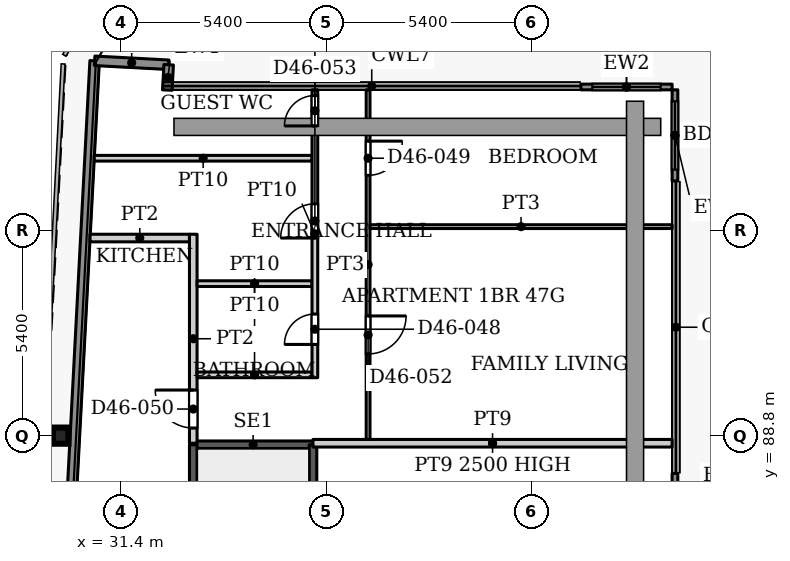
"""IFC4 building model, lengths in metres.
Left out: names, types, materials, properties, quantities, classifications, styles, units other than length and angle.
Written with IfcOpenShell. Run it as: python <this file> out.ifc"""

import sys

from ifc_helpers import new_model, si_unit, direction, frame, frame_2d, origin, origin_2d, place, context, subcontext, project, spatial, rectangle, i_section, extrude, source, transform, mapped, element, fill, save


model = new_model("IFC4")
c1 = context("Model", 3, precision=1e-05, world=origin(), true_north=direction((0.0, 1.0)))
c2 = subcontext(c1, "Body", "Model", "MODEL_VIEW")
j1 = project(units=[si_unit("LENGTHUNIT", "METRE"), si_unit("PLANEANGLEUNIT", "RADIAN")], contexts=[c1])
p1 = place(None, origin())
s1 = spatial("IfcSite", under=j1, at=p1, CompositionType="ELEMENT")
p2 = place(p1, origin())
s2 = spatial("IfcBuilding", under=s1, at=p2, CompositionType="ELEMENT")
p3 = place(p2, frame((0.0, 0.0, 199.4)))
s3 = spatial("IfcBuildingStorey", under=s2, at=p3, CompositionType="ELEMENT", Elevation=199.4)
p4 = place(p3, frame((29.811, 88.8, 0.0), z_axis=(0.0, 0.0, 1.0), x_axis=(1.0, 0.0, 0.0)))
e1 = element("IfcColumn", 1, at=p4, inside=s3, PredefinedType="COLUMN", context=c2, shape_type="SweptSolid", body=[
    extrude(i_section(OverallWidth=0.409, OverallDepth=0.425, WebThickness=0.033, FlangeThickness=0.052, FilletRadius=0.013, at=origin_2d()), origin(), (0.0, 0.0, 1.0), 3.9),
])
p5 = place(p3, frame((27.195, 31.969, 0.0), z_axis=(0.0, 0.0, 1.0), x_axis=(0.052554995867, 0.998618031286, 0.0)))
e2 = element("IfcWall", 2, at=p5, inside=s3, PredefinedType="SOLIDWALL", context=c2, shape_type="SweptSolid", body=[
    extrude(rectangle(XDim=66.787, YDim=0.25, at=frame_2d((33.394, 0.0))), origin(), (0.0, 0.0, 1.0), 3.75),
])
p6 = place(p3, frame((30.705, 98.664, 0.0), z_axis=(0.0, 0.0, 1.0), x_axis=(0.998577785791, -0.053314216913, 0.0)))
e3 = element("IfcWall", 3, at=p6, inside=s3, PredefinedType="SOLIDWALL", context=c2, shape_type="SweptSolid", body=[
    extrude(rectangle(XDim=1.951, YDim=0.25, at=frame_2d((0.975, 0.0))), origin(), (0.0, 0.0, 1.0), 3.75),
])
p7 = place(p3, frame((32.653, 98.56, 0.0), z_axis=(0.0, 0.0, 1.0), x_axis=(-0.054093451632, -0.998535877418, 0.0)))
e4 = element("IfcWall", 4, at=p7, inside=s3, PredefinedType="SOLIDWALL", context=c2, shape_type="SweptSolid", body=[
    extrude(rectangle(XDim=0.668, YDim=0.25, at=frame_2d((0.334, 0.0))), origin(), (0.0, 0.0, 1.0), 3.75),
])
p8 = place(p3, frame((43.5, 97.975, 0.0), z_axis=(0.0, 0.0, 1.0), x_axis=(1.0, 0.0, 0.0)))
e5 = element("IfcWall", 5, at=p8, inside=s3, PredefinedType="SOLIDWALL", context=c2, shape_type="SweptSolid", body=[
    extrude(rectangle(XDim=2.4, YDim=0.15, at=frame_2d((1.2, 0.0))), origin(), (0.0, 0.0, 1.0), 3.75),
])
p9 = place(p8, frame((0.3, 0.0, 0.0)))
e6 = element("IfcOpeningElement", 6, at=p9, cuts=e5, PredefinedType="OPENING", context=c2, shape_type="SweptSolid", body=[
    extrude(rectangle(XDim=1.8, YDim=2.4, at=frame_2d((0.9, 1.2))), frame((0.0, 0.085, 0.0), z_axis=(0.0, -1.0, 0.0), x_axis=(1.0, 0.0, 0.0)), (0.0, 0.0, 1.0), 0.17),
])
p10 = place(p3, frame((45.975, 97.9, 0.0), z_axis=(0.0, 0.0, 1.0), x_axis=(0.0, -1.0, 0.0)))
e7 = element("IfcWall", 7, at=p10, inside=s3, PredefinedType="SOLIDWALL", context=c2, shape_type="SweptSolid", body=[
    extrude(rectangle(XDim=2.4, YDim=0.15, at=frame_2d((1.2, 0.0))), origin(), (0.0, 0.0, 1.0), 3.75),
])
p11 = place(p10, frame((0.3, 0.0, 0.0)))
e8 = element("IfcOpeningElement", 8, at=p11, cuts=e7, PredefinedType="OPENING", context=c2, shape_type="SweptSolid", body=[
    extrude(rectangle(XDim=1.8, YDim=2.4, at=frame_2d((0.9, 1.2))), frame((0.0, 0.085, 0.0), z_axis=(0.0, -1.0, 0.0), x_axis=(1.0, 0.0, 0.0)), (0.0, 0.0, 1.0), 0.17),
])
p12 = place(p3, frame((45.975, 87.806, 0.0), z_axis=(0.0, 0.0, 1.0), x_axis=(0.0, -1.0, 0.0)))
e9 = element("IfcWall", 9, at=p12, inside=s3, PredefinedType="SOLIDWALL", context=c2, shape_type="SweptSolid", body=[
    extrude(rectangle(XDim=2.4, YDim=0.15, at=frame_2d((1.2, 0.0))), origin(), (0.0, 0.0, 1.0), 3.75),
])
p13 = place(p12, frame((0.3, 0.0, 0.0)))
e10 = element("IfcOpeningElement", 10, at=p13, cuts=e9, PredefinedType="OPENING", context=c2, shape_type="SweptSolid", body=[
    extrude(rectangle(XDim=1.8, YDim=2.4, at=frame_2d((0.9, 1.2))), frame((0.0, 0.085, 0.0), z_axis=(0.0, -1.0, 0.0), x_axis=(1.0, 0.0, 0.0)), (0.0, 0.0, 1.0), 0.17),
])
p14 = place(p3, frame((33.3, 88.56, 0.0), z_axis=(0.0, 0.0, 1.0), x_axis=(1.0, 0.0, 0.0)))
e11 = element("IfcWall", 11, at=p14, inside=s3, PredefinedType="SHEAR", context=c2, shape_type="SweptSolid", body=[
    extrude(rectangle(XDim=3.15, YDim=0.2, at=frame_2d((1.575, 0.0))), origin(), (0.0, 0.0, 1.0), 3.9),
])
p15 = place(p3, frame((33.3, 79.4, 0.0), z_axis=(0.0, 0.0, 1.0), x_axis=(0.0, 1.0, 0.0)))
e12 = element("IfcWall", 12, at=p15, inside=s3, PredefinedType="SHEAR", context=c2, shape_type="SweptSolid", body=[
    extrude(rectangle(XDim=9.16, YDim=0.2, at=frame_2d((4.58, 0.0))), origin(), (0.0, 0.0, 1.0), 3.9),
])
p16 = place(p15, frame((0.35, 0.0, 0.0)))
e13 = element("IfcOpeningElement", 13, at=p16, cuts=e12, PredefinedType="OPENING", context=c2, shape_type="SweptSolid", body=[
    extrude(rectangle(XDim=1.1, YDim=2.2, at=frame_2d((0.55, 1.1))), frame((0.0, 0.11, 0.0), z_axis=(0.0, -1.0, 0.0), x_axis=(1.0, 0.0, 0.0)), (0.0, 0.0, 1.0), 0.22),
])
p17 = place(p3, frame((36.45, 79.4, 0.0), z_axis=(0.0, 0.0, 1.0), x_axis=(0.0, 1.0, 0.0)))
e14 = element("IfcWall", 14, at=p17, inside=s3, PredefinedType="SHEAR", context=c2, shape_type="SweptSolid", body=[
    extrude(rectangle(XDim=9.16, YDim=0.2, at=frame_2d((4.58, 0.0))), origin(), (0.0, 0.0, 1.0), 3.9),
])
p18 = place(p3, frame((30.695, 96.1, 0.0), z_axis=(0.0, 0.0, 1.0), x_axis=(1.0, 0.0, 0.0)))
e15 = element("IfcWall", 15, at=p18, inside=s3, PredefinedType="PARTITIONING", context=c2, shape_type="SweptSolid", body=[
    extrude(rectangle(XDim=5.73, YDim=0.15, at=frame_2d((2.865, 0.0))), origin(), (0.0, 0.0, 1.0), 3.6),
])
p19 = place(p3, frame((30.585, 94.0, 0.0), z_axis=(0.0, 0.0, 1.0), x_axis=(1.0, 0.0, 0.0)))
e16 = element("IfcWall", 16, at=p19, inside=s3, PredefinedType="PARTITIONING", context=c2, shape_type="SweptSolid", body=[
    extrude(rectangle(XDim=2.615, YDim=0.2, at=frame_2d((1.308, 0.0))), origin(), (0.0, 0.0, 1.0), 3.6),
])
p20 = place(p3, frame((33.3, 88.6, 0.0), z_axis=(0.0, 0.0, 1.0), x_axis=(0.0, 1.0, 0.0)))
e17 = element("IfcWall", 17, at=p20, inside=s3, PredefinedType="PARTITIONING", context=c2, shape_type="SweptSolid", body=[
    extrude(rectangle(XDim=5.5, YDim=0.2, at=frame_2d((2.75, 0.0))), origin(), (0.0, 0.0, 1.0), 3.6),
])
p21 = place(p20, frame((0.4, 0.0, 0.0)))
e18 = element("IfcOpeningElement", 18, at=p21, cuts=e17, PredefinedType="OPENING", context=c2, shape_type="SweptSolid", body=[
    extrude(rectangle(XDim=1.0, YDim=2.1, at=frame_2d((0.5, 1.05))), frame((0.0, 0.11, 0.0), z_axis=(0.0, -1.0, 0.0), x_axis=(1.0, 0.0, 0.0)), (0.0, 0.0, 1.0), 0.22),
])
for number, where, z_axis, x_axis in (
    (19, (33.4, 90.4, 0.0), (0.0, 0.0, 1.0), (1.0, 0.0, 0.0)),
    (20, (33.4, 92.8, 0.0), (0.0, 0.0, 1.0), (1.0, 0.0, 0.0)),
):
    element("IfcWall", number, at=place(p3, frame(where, z_axis=z_axis, x_axis=x_axis)), inside=s3, PredefinedType="PARTITIONING", context=c2, shape_type="SweptSolid", body=[
        extrude(rectangle(XDim=3.025, YDim=0.15, at=frame_2d((1.513, 0.0))), origin(), (0.0, 0.0, 1.0), 3.6),
    ])
p22 = place(p3, frame((36.45, 88.6, 0.0), z_axis=(0.0, 0.0, 1.0), x_axis=(1.0, 0.0, 0.0)))
e21 = element("IfcWall", 21, at=p22, inside=s3, PredefinedType="PARTITIONING", context=c2, shape_type="SweptSolid", body=[
    extrude(rectangle(XDim=9.45, YDim=0.2, at=frame_2d((4.725, 0.0))), origin(), (0.0, 0.0, 1.0), 2.5),
])
p23 = place(p3, frame((36.5, 90.325, 0.0), z_axis=(0.0, 0.0, 1.0), x_axis=(0.0, 1.0, 0.0)))
e22 = element("IfcWall", 22, at=p23, inside=s3, PredefinedType="PARTITIONING", context=c2, shape_type="SweptSolid", body=[
    extrude(rectangle(XDim=7.575, YDim=0.15, at=frame_2d((3.788, 0.0))), origin(), (0.0, 0.0, 1.0), 3.6),
])
p24 = place(p23, frame((0.875, 0.0, 0.0)))
e23 = element("IfcOpeningElement", 23, at=p24, cuts=e22, PredefinedType="OPENING", context=c2, shape_type="SweptSolid", body=[
    extrude(rectangle(XDim=0.8, YDim=2.1, at=frame_2d((0.4, 1.05))), frame((0.0, 0.085, 0.0), z_axis=(0.0, -1.0, 0.0), x_axis=(1.0, 0.0, 0.0)), (0.0, 0.0, 1.0), 0.17),
])
p25 = place(p23, frame((3.675, 0.0, 0.0)))
e24 = element("IfcOpeningElement", 24, at=p25, cuts=e22, PredefinedType="OPENING", context=c2, shape_type="SweptSolid", body=[
    extrude(rectangle(XDim=0.9, YDim=2.1, at=frame_2d((0.45, 1.05))), frame((0.0, 0.085, 0.0), z_axis=(0.0, -1.0, 0.0), x_axis=(1.0, 0.0, 0.0)), (0.0, 0.0, 1.0), 0.17),
])
p26 = place(p23, frame((6.625, 0.0, 0.0)))
e25 = element("IfcOpeningElement", 25, at=p26, cuts=e22, PredefinedType="OPENING", context=c2, shape_type="SweptSolid", body=[
    extrude(rectangle(XDim=0.8, YDim=2.1, at=frame_2d((0.4, 1.05))), frame((0.0, 0.085, 0.0), z_axis=(0.0, -1.0, 0.0), x_axis=(1.0, 0.0, 0.0)), (0.0, 0.0, 1.0), 0.17),
])
p27 = place(p3, frame((37.9, 88.7, 0.0), z_axis=(0.0, 0.0, 1.0), x_axis=(0.0, 1.0, 0.0)))
e26 = element("IfcWall", 26, at=p27, inside=s3, PredefinedType="PARTITIONING", context=c2, shape_type="SweptSolid", body=[
    extrude(rectangle(XDim=9.2, YDim=0.1, at=frame_2d((4.6, 0.0))), origin(), (0.0, 0.0, 1.0), 3.6),
])
p28 = place(p27, frame((6.95, 0.0, 0.0)))
e27 = element("IfcOpeningElement", 27, at=p28, cuts=e26, PredefinedType="OPENING", context=c2, shape_type="SweptSolid", body=[
    extrude(rectangle(XDim=0.9, YDim=2.1, at=frame_2d((0.45, 1.05))), frame((0.0, 0.06, 0.0), z_axis=(0.0, -1.0, 0.0), x_axis=(1.0, 0.0, 0.0)), (0.0, 0.0, 1.0), 0.12),
])
p29 = place(p27, frame((2.25, 0.0, 0.0)))
e28 = element("IfcOpeningElement", 28, at=p29, cuts=e26, PredefinedType="OPENING", context=c2, shape_type="SweptSolid", body=[
    extrude(rectangle(XDim=1.0, YDim=2.1, at=frame_2d((0.5, 1.05))), frame((0.0, 0.06, 0.0), z_axis=(0.0, -1.0, 0.0), x_axis=(1.0, 0.0, 0.0)), (0.0, 0.0, 1.0), 0.12),
])
p30 = place(p3, frame((37.95, 94.3, 0.0), z_axis=(0.0, 0.0, 1.0), x_axis=(1.0, 0.0, 0.0)))
e29 = element("IfcWall", 29, at=p30, inside=s3, PredefinedType="PARTITIONING", context=c2, shape_type="SweptSolid", body=[
    extrude(rectangle(XDim=7.95, YDim=0.1, at=frame_2d((3.975, 0.0))), origin(), (0.0, 0.0, 1.0), 3.6),
])
m1 = source(origin(), c2, "Body", "SweptSolid", [
    extrude(rectangle(XDim=1.8, YDim=2.4, at=frame_2d((0.9, 1.2))), frame((0.0, 0.025, 0.0), z_axis=(0.0, -1.0, 0.0), x_axis=(1.0, 0.0, 0.0)), (0.0, 0.0, 1.0), 0.05),
])
p31 = place(p9, origin())
e30 = element("IfcDoor", 30, at=p31, inside=s3, OperationType="SLIDING_TO_LEFT", PredefinedType="DOOR", context=c2, shape_type="MappedRepresentation", body=[
    mapped(m1, transform((0.0, 0.0, 0.0), x_axis=(1.0, 0.0, 0.0), y_axis=(0.0, 1.0, 0.0), z_axis=(0.0, 0.0, 1.0), scale=1.0)),
])
fill(e6, e30)
p32 = place(p11, origin())
e31 = element("IfcDoor", 31, at=p32, inside=s3, OperationType="SLIDING_TO_LEFT", PredefinedType="DOOR", context=c2, shape_type="MappedRepresentation", body=[
    mapped(m1, transform((0.0, 0.0, 0.0), x_axis=(1.0, 0.0, 0.0), y_axis=(0.0, 1.0, 0.0), z_axis=(0.0, 0.0, 1.0), scale=1.0)),
])
fill(e8, e31)
m2 = source(origin(), c2, "Body", "SweptSolid", [
    extrude(rectangle(XDim=0.8, YDim=2.1, at=frame_2d((0.4, 1.05))), frame((0.0, 0.025, 0.0), z_axis=(0.0, -1.0, 0.0), x_axis=(1.0, 0.0, 0.0)), (0.0, 0.0, 1.0), 0.05),
])
p33 = place(p24, origin())
e32 = element("IfcDoor", 32, at=p33, inside=s3, OperationType="SINGLE_SWING_LEFT", PredefinedType="DOOR", context=c2, shape_type="MappedRepresentation", body=[
    mapped(m2, transform((0.0, 0.0, 0.0), x_axis=(1.0, 0.0, 0.0), y_axis=(0.0, 1.0, 0.0), z_axis=(0.0, 0.0, 1.0), scale=1.0)),
])
fill(e23, e32)
m3 = source(origin(), c2, "Body", "SweptSolid", [
    extrude(rectangle(XDim=0.9, YDim=2.1, at=frame_2d((0.45, 1.05))), frame((0.0, 0.025, 0.0), z_axis=(0.0, -1.0, 0.0), x_axis=(1.0, 0.0, 0.0)), (0.0, 0.0, 1.0), 0.05),
])
p34 = place(p28, origin())
e33 = element("IfcDoor", 33, at=p34, inside=s3, OperationType="SINGLE_SWING_RIGHT", PredefinedType="DOOR", context=c2, shape_type="MappedRepresentation", body=[
    mapped(m3, transform((0.0, 0.0, 0.0), x_axis=(1.0, 0.0, 0.0), y_axis=(0.0, 1.0, 0.0), z_axis=(0.0, 0.0, 1.0), scale=1.0)),
])
fill(e27, e33)
m4 = source(origin(), c2, "Body", "SweptSolid", [
    extrude(rectangle(XDim=1.0, YDim=2.1, at=frame_2d((0.5, 1.05))), frame((0.0, 0.025, 0.0), z_axis=(0.0, -1.0, 0.0), x_axis=(1.0, 0.0, 0.0)), (0.0, 0.0, 1.0), 0.05),
])
p35 = place(p21, origin())
e34 = element("IfcDoor", 34, at=p35, inside=s3, OperationType="SINGLE_SWING_LEFT", PredefinedType="DOOR", context=c2, shape_type="MappedRepresentation", body=[
    mapped(m4, transform((0.0, 0.0, 0.0), x_axis=(1.0, 0.0, 0.0), y_axis=(0.0, 1.0, 0.0), z_axis=(0.0, 0.0, 1.0), scale=1.0)),
])
fill(e18, e34)
p36 = place(p25, origin())
e35 = element("IfcDoor", 35, at=p36, inside=s3, OperationType="SINGLE_SWING_LEFT", PredefinedType="DOOR", context=c2, shape_type="MappedRepresentation", body=[
    mapped(m3, transform((0.0, 0.0, 0.0), x_axis=(1.0, 0.0, 0.0), y_axis=(0.0, 1.0, 0.0), z_axis=(0.0, 0.0, 1.0), scale=1.0)),
])
fill(e24, e35)
m5 = source(origin(), c2, "Body", "SweptSolid", [
    extrude(rectangle(XDim=1.0, YDim=2.1, at=frame_2d((0.5, 1.05))), frame((0.0, 0.025, 0.0), z_axis=(0.0, -1.0, 0.0), x_axis=(1.0, 0.0, 0.0)), (0.0, 0.0, 1.0), 0.05),
])
p37 = place(p29, origin())
e36 = element("IfcDoor", 36, at=p37, inside=s3, OperationType="SINGLE_SWING_RIGHT", PredefinedType="DOOR", context=c2, shape_type="MappedRepresentation", body=[
    mapped(m5, transform((0.0, 0.0, 0.0), x_axis=(1.0, 0.0, 0.0), y_axis=(0.0, 1.0, 0.0), z_axis=(0.0, 0.0, 1.0), scale=1.0)),
])
fill(e28, e36)
p38 = place(p26, origin())
e37 = element("IfcDoor", 37, at=p38, inside=s3, OperationType="SINGLE_SWING_LEFT", PredefinedType="DOOR", context=c2, shape_type="MappedRepresentation", body=[
    mapped(m2, transform((0.0, 0.0, 0.0), x_axis=(1.0, 0.0, 0.0), y_axis=(0.0, 1.0, 0.0), z_axis=(0.0, 0.0, 1.0), scale=1.0)),
])
fill(e25, e37)
save(model, sys.argv[1])
